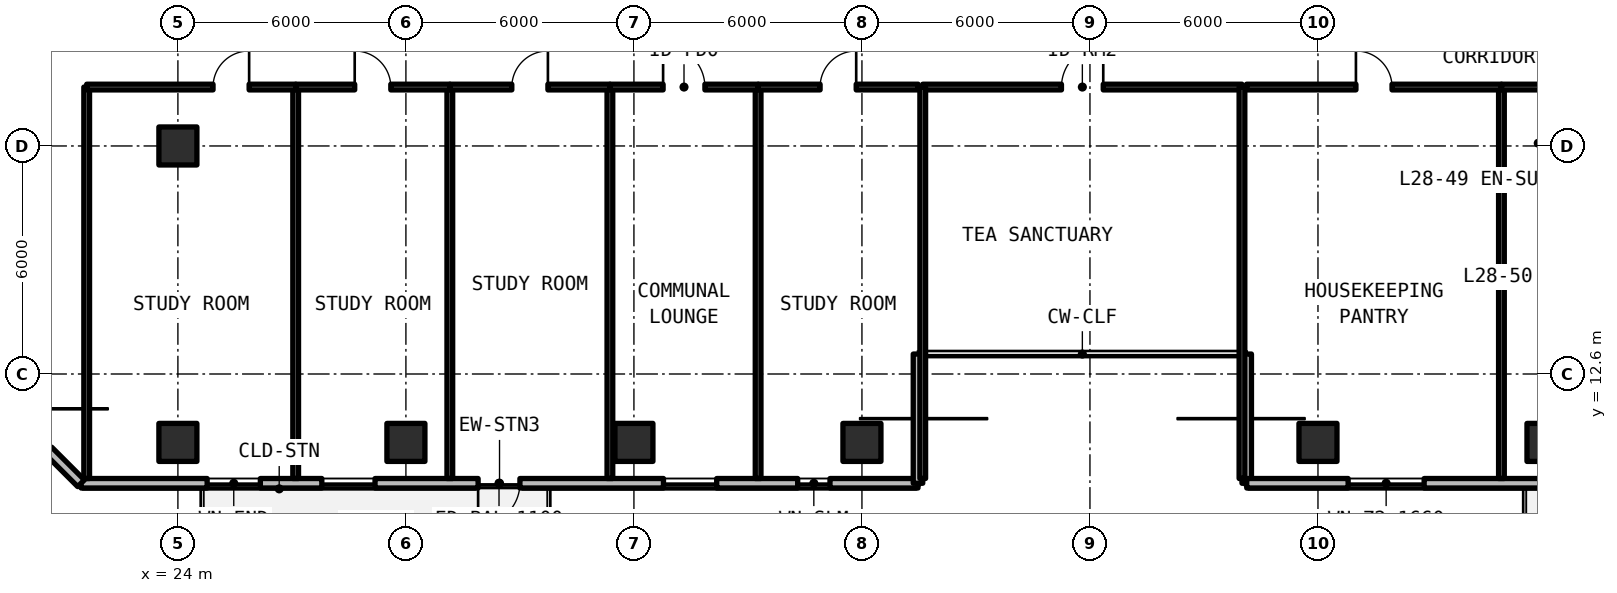
"""IFC4 building model, lengths in metres.
Left out: names, types, materials, properties, quantities, classifications, styles, units other than length and angle.
Written with IfcOpenShell. Run it as: python <this file> out.ifc"""

import sys

from ifc_helpers import new_model, si_unit, direction, frame, frame_2d, origin, origin_2d, place, context, subcontext, project, spatial, rectangle, extrude, element, fill, save


model = new_model("IFC4")
c1 = context("Model", 3, precision=1e-05, world=origin(), true_north=direction((0.0, 1.0)))
c2 = subcontext(c1, "Body", "Model", "MODEL_VIEW")
j1 = project(units=[si_unit("LENGTHUNIT", "METRE"), si_unit("PLANEANGLEUNIT", "RADIAN")], contexts=[c1])
p1 = place(None, origin())
s1 = spatial("IfcSite", under=j1, at=p1, CompositionType="ELEMENT")
p2 = place(p1, origin())
s2 = spatial("IfcBuilding", under=s1, at=p2, CompositionType="ELEMENT")
p3 = place(p2, frame((0.0, 0.0, 101.97)))
s3 = spatial("IfcBuildingStorey", under=s2, at=p3, CompositionType="ELEMENT", Elevation=101.97)
for number, where, z_axis, x_axis in (
    (1, (24.0, 18.6, 0.0), (0.0, 0.0, 1.0), (1.0, 0.0, 0.0)),
    (2, (24.0, 10.8, 0.0), (0.0, 0.0, 1.0), (1.0, 0.0, 0.0)),
    (3, (30.0, 10.8, 0.0), (0.0, 0.0, 1.0), (1.0, 0.0, 0.0)),
    (4, (36.0, 10.8, 0.0), (0.0, 0.0, 1.0), (1.0, 0.0, 0.0)),
    (5, (42.0, 10.8, 0.0), (0.0, 0.0, 1.0), (1.0, 0.0, 0.0)),
    (6, (54.0, 10.8, 0.0), (0.0, 0.0, 1.0), (1.0, 0.0, 0.0)),
    (7, (60.0, 10.8, 0.0), (0.0, 0.0, 1.0), (1.0, 0.0, 0.0)),
):
    element("IfcColumn", number, at=place(p3, frame(where, z_axis=z_axis, x_axis=x_axis)), inside=s3, PredefinedType="COLUMN", context=c2, shape_type="SweptSolid", body=[
        extrude(rectangle(XDim=1.0, YDim=1.0, at=origin_2d()), origin(), (0.0, 0.0, 1.0), 3.3),
    ])
p4 = place(p3, frame((21.452, 9.725, 0.0), z_axis=(0.0, 0.0, 1.0), x_axis=(1.0, 0.0, 0.0)))
e8 = element("IfcWall", 8, at=p4, inside=s3, PredefinedType="SOLIDWALL", context=c2, shape_type="SweptSolid", body=[
    extrude(rectangle(XDim=22.023, YDim=0.25, at=frame_2d((11.012, 0.0))), origin(), (0.0, 0.0, 1.0), 3.08),
])
p5 = place(p4, frame((10.448, 0.0, 0.0)))
e9 = element("IfcOpeningElement", 9, at=p5, cuts=e8, PredefinedType="OPENING", context=c2, shape_type="SweptSolid", body=[
    extrude(rectangle(XDim=1.1, YDim=2.15, at=frame_2d((0.55, 1.075))), frame((0.0, 0.135, 0.0), z_axis=(0.0, -1.0, 0.0), x_axis=(1.0, 0.0, 0.0)), (0.0, 0.0, 1.0), 0.27),
])
p6 = place(p4, frame((3.318, 0.0, 0.78)))
e10 = element("IfcOpeningElement", 10, at=p6, cuts=e8, PredefinedType="OPENING", context=c2, shape_type="SweptSolid", body=[
    extrude(rectangle(XDim=1.4, YDim=1.65, at=frame_2d((0.7, 0.825))), frame((0.0, 0.135, 0.0), z_axis=(0.0, -1.0, 0.0), x_axis=(1.0, 0.0, 0.0)), (0.0, 0.0, 1.0), 0.27),
])
p7 = place(p4, frame((6.336, 0.0, 0.78)))
e11 = element("IfcOpeningElement", 11, at=p7, cuts=e8, PredefinedType="OPENING", context=c2, shape_type="SweptSolid", body=[
    extrude(rectangle(XDim=1.4, YDim=1.65, at=frame_2d((0.7, 0.825))), frame((0.0, 0.135, 0.0), z_axis=(0.0, -1.0, 0.0), x_axis=(1.0, 0.0, 0.0)), (0.0, 0.0, 1.0), 0.27),
])
p8 = place(p4, frame((15.326, 0.0, 0.78)))
e12 = element("IfcOpeningElement", 12, at=p8, cuts=e8, PredefinedType="OPENING", context=c2, shape_type="SweptSolid", body=[
    extrude(rectangle(XDim=1.4, YDim=1.65, at=frame_2d((0.7, 0.825))), frame((0.0, 0.135, 0.0), z_axis=(0.0, -1.0, 0.0), x_axis=(1.0, 0.0, 0.0)), (0.0, 0.0, 1.0), 0.27),
])
p9 = place(p4, frame((18.857, 0.0, 0.78)))
e13 = element("IfcOpeningElement", 13, at=p9, cuts=e8, PredefinedType="OPENING", context=c2, shape_type="SweptSolid", body=[
    extrude(rectangle(XDim=0.85, YDim=1.65, at=frame_2d((0.425, 0.825))), frame((0.0, 0.135, 0.0), z_axis=(0.0, -1.0, 0.0), x_axis=(1.0, 0.0, 0.0)), (0.0, 0.0, 1.0), 0.27),
])
for number, where, z_axis, x_axis in (
    (14, (43.475, 9.725, 0.0), (0.0, 0.0, 1.0), (0.0, 1.0, 0.0)),
    (15, (52.125, 13.125, 0.0), (0.0, 0.0, 1.0), (0.0, -1.0, 0.0)),
):
    element("IfcWall", number, at=place(p3, frame(where, z_axis=z_axis, x_axis=x_axis)), inside=s3, PredefinedType="SOLIDWALL", context=c2, shape_type="SweptSolid", body=[
        extrude(rectangle(XDim=3.4, YDim=0.25, at=frame_2d((1.7, 0.0))), origin(), (0.0, 0.0, 1.0), 3.08),
    ])
p10 = place(p3, frame((52.125, 9.725, 0.0), z_axis=(0.0, 0.0, 1.0), x_axis=(1.0, 0.0, 0.0)))
e16 = element("IfcWall", 16, at=p10, inside=s3, PredefinedType="SOLIDWALL", context=c2, shape_type="SweptSolid", body=[
    extrude(rectangle(XDim=44.023, YDim=0.25, at=frame_2d((22.012, 0.0))), origin(), (0.0, 0.0, 1.0), 3.08),
])
p11 = place(p10, frame((11.075, 0.0, 0.0)))
e17 = element("IfcOpeningElement", 17, at=p11, cuts=e16, PredefinedType="OPENING", context=c2, shape_type="SweptSolid", body=[
    extrude(rectangle(XDim=1.1, YDim=2.15, at=frame_2d((0.55, 1.075))), frame((0.0, 0.135, 0.0), z_axis=(0.0, -1.0, 0.0), x_axis=(1.0, 0.0, 0.0)), (0.0, 0.0, 1.0), 0.27),
])
p12 = place(p10, frame((22.175, 0.0, 0.0)))
e18 = element("IfcOpeningElement", 18, at=p12, cuts=e16, PredefinedType="OPENING", context=c2, shape_type="SweptSolid", body=[
    extrude(rectangle(XDim=1.1, YDim=2.15, at=frame_2d((0.55, 1.075))), frame((0.0, 0.135, 0.0), z_axis=(0.0, -1.0, 0.0), x_axis=(1.0, 0.0, 0.0)), (0.0, 0.0, 1.0), 0.27),
])
p13 = place(p10, frame((34.525, 0.0, 0.0)))
e19 = element("IfcOpeningElement", 19, at=p13, cuts=e16, PredefinedType="OPENING", context=c2, shape_type="SweptSolid", body=[
    extrude(rectangle(XDim=1.1, YDim=2.15, at=frame_2d((0.55, 1.075))), frame((0.0, 0.135, 0.0), z_axis=(0.0, -1.0, 0.0), x_axis=(1.0, 0.0, 0.0)), (0.0, 0.0, 1.0), 0.27),
])
p14 = place(p10, frame((2.669, 0.0, 0.78)))
e20 = element("IfcOpeningElement", 20, at=p14, cuts=e16, PredefinedType="OPENING", context=c2, shape_type="SweptSolid", body=[
    extrude(rectangle(XDim=2.0, YDim=1.66, at=frame_2d((1.0, 0.83))), frame((0.0, 0.135, 0.0), z_axis=(0.0, -1.0, 0.0), x_axis=(1.0, 0.0, 0.0)), (0.0, 0.0, 1.0), 0.27),
])
p15 = place(p10, frame((8.314, 0.0, 0.78)))
e21 = element("IfcOpeningElement", 21, at=p15, cuts=e16, PredefinedType="OPENING", context=c2, shape_type="SweptSolid", body=[
    extrude(rectangle(XDim=0.85, YDim=1.65, at=frame_2d((0.425, 0.825))), frame((0.0, 0.135, 0.0), z_axis=(0.0, -1.0, 0.0), x_axis=(1.0, 0.0, 0.0)), (0.0, 0.0, 1.0), 0.27),
])
p16 = place(p10, frame((15.009, 0.0, 0.78)))
e22 = element("IfcOpeningElement", 22, at=p16, cuts=e16, PredefinedType="OPENING", context=c2, shape_type="SweptSolid", body=[
    extrude(rectangle(XDim=0.85, YDim=1.65, at=frame_2d((0.425, 0.825))), frame((0.0, 0.135, 0.0), z_axis=(0.0, -1.0, 0.0), x_axis=(1.0, 0.0, 0.0)), (0.0, 0.0, 1.0), 0.27),
])
p17 = place(p10, frame((17.708, 0.0, 0.78)))
e23 = element("IfcOpeningElement", 23, at=p17, cuts=e16, PredefinedType="OPENING", context=c2, shape_type="SweptSolid", body=[
    extrude(rectangle(XDim=1.4, YDim=1.65, at=frame_2d((0.7, 0.825))), frame((0.0, 0.135, 0.0), z_axis=(0.0, -1.0, 0.0), x_axis=(1.0, 0.0, 0.0)), (0.0, 0.0, 1.0), 0.27),
])
p18 = place(p10, frame((26.714, 0.0, 0.78)))
e24 = element("IfcOpeningElement", 24, at=p18, cuts=e16, PredefinedType="OPENING", context=c2, shape_type="SweptSolid", body=[
    extrude(rectangle(XDim=1.4, YDim=1.65, at=frame_2d((0.7, 0.825))), frame((0.0, 0.135, 0.0), z_axis=(0.0, -1.0, 0.0), x_axis=(1.0, 0.0, 0.0)), (0.0, 0.0, 1.0), 0.27),
])
p19 = place(p10, frame((29.618, 0.0, 0.78)))
e25 = element("IfcOpeningElement", 25, at=p19, cuts=e16, PredefinedType="OPENING", context=c2, shape_type="SweptSolid", body=[
    extrude(rectangle(XDim=1.4, YDim=1.65, at=frame_2d((0.7, 0.825))), frame((0.0, 0.135, 0.0), z_axis=(0.0, -1.0, 0.0), x_axis=(1.0, 0.0, 0.0)), (0.0, 0.0, 1.0), 0.27),
])
p20 = place(p10, frame((39.102, 0.0, 0.78)))
e26 = element("IfcOpeningElement", 26, at=p20, cuts=e16, PredefinedType="OPENING", context=c2, shape_type="SweptSolid", body=[
    extrude(rectangle(XDim=2.0, YDim=1.66, at=frame_2d((1.0, 0.83))), frame((0.0, 0.135, 0.0), z_axis=(0.0, -1.0, 0.0), x_axis=(1.0, 0.0, 0.0)), (0.0, 0.0, 1.0), 0.27),
])
p21 = place(p3, frame((17.325, 13.852, 0.0), z_axis=(0.0, 0.0, 1.0), x_axis=(0.707127696864, -0.70708586489, 0.0)))
e27 = element("IfcWall", 27, at=p21, inside=s3, PredefinedType="SOLIDWALL", context=c2, shape_type="SweptSolid", body=[
    extrude(rectangle(XDim=5.836, YDim=0.25, at=frame_2d((2.918, 0.0))), origin(), (0.0, 0.0, 1.0), 3.08),
])
p22 = place(p21, frame((1.218, 0.0, 0.78)))
e28 = element("IfcOpeningElement", 28, at=p22, cuts=e27, PredefinedType="OPENING", context=c2, shape_type="SweptSolid", body=[
    extrude(rectangle(XDim=3.4, YDim=1.66, at=frame_2d((1.7, 0.83))), frame((0.0, 0.135, 0.0), z_axis=(0.0, -1.0, 0.0), x_axis=(1.0, 0.0, 0.0)), (0.0, 0.0, 1.0), 0.27),
])
p23 = place(p3, frame((43.6, 20.15, 0.0), z_axis=(0.0, 0.0, 1.0), x_axis=(1.0, 0.0, 0.0)))
e29 = element("IfcWall", 29, at=p23, inside=s3, PredefinedType="SOLIDWALL", context=c2, shape_type="SweptSolid", body=[
    extrude(rectangle(XDim=8.4, YDim=0.15, at=frame_2d((4.2, 0.0))), origin(), (0.0, 0.0, 1.0), 2.35),
])
p24 = place(p23, frame((3.65, 0.0, 0.0)))
e30 = element("IfcOpeningElement", 30, at=p24, cuts=e29, PredefinedType="OPENING", context=c2, shape_type="SweptSolid", body=[
    extrude(rectangle(XDim=1.1, YDim=2.15, at=frame_2d((0.55, 1.075))), frame((0.0, 0.085, 0.0), z_axis=(0.0, -1.0, 0.0), x_axis=(1.0, 0.0, 0.0)), (0.0, 0.0, 1.0), 0.17),
])
for number, where, z_axis, x_axis in (
    (31, (43.6, 9.85, 0.0), (0.0, 0.0, 1.0), (0.0, 1.0, 0.0)),
    (32, (52.0, 9.85, 0.0), (0.0, 0.0, 1.0), (0.0, 1.0, 0.0)),
    (33, (21.6, 9.85, 0.0), (0.0, 0.0, 1.0), (0.0, 1.0, 0.0)),
    (34, (27.099, 9.85, 0.0), (0.0, 0.0, 1.0), (0.0, 1.0, 0.0)),
):
    element("IfcWall", number, at=place(p3, frame(where, z_axis=z_axis, x_axis=x_axis)), inside=s3, PredefinedType="SOLIDWALL", context=c2, shape_type="SweptSolid", body=[
        extrude(rectangle(XDim=10.3, YDim=0.15, at=frame_2d((5.15, 0.0))), origin(), (0.0, 0.0, 1.0), 2.35),
    ])
p25 = place(p3, frame((21.6, 20.15, 0.0), z_axis=(0.0, 0.0, 1.0), x_axis=(1.0, 0.0, 0.0)))
e35 = element("IfcWall", 35, at=p25, inside=s3, PredefinedType="SOLIDWALL", context=c2, shape_type="SweptSolid", body=[
    extrude(rectangle(XDim=5.499, YDim=0.15, at=frame_2d((2.75, 0.0))), origin(), (0.0, 0.0, 1.0), 2.35),
])
p26 = place(p25, frame((3.325, 0.0, 0.0)))
e36 = element("IfcOpeningElement", 36, at=p26, cuts=e35, PredefinedType="OPENING", context=c2, shape_type="SweptSolid", body=[
    extrude(rectangle(XDim=0.95, YDim=2.15, at=frame_2d((0.475, 1.075))), frame((0.0, 0.085, 0.0), z_axis=(0.0, -1.0, 0.0), x_axis=(1.0, 0.0, 0.0)), (0.0, 0.0, 1.0), 0.17),
])
p27 = place(p3, frame((31.156, 9.85, 0.0), z_axis=(0.0, 0.0, 1.0), x_axis=(0.0, 1.0, 0.0)))
e37 = element("IfcWall", 37, at=p27, inside=s3, PredefinedType="SOLIDWALL", context=c2, shape_type="SweptSolid", body=[
    extrude(rectangle(XDim=10.3, YDim=0.15, at=frame_2d((5.15, 0.0))), origin(), (0.0, 0.0, 1.0), 2.35),
])
p28 = place(p3, frame((27.099, 20.15, 0.0), z_axis=(0.0, 0.0, 1.0), x_axis=(1.0, 0.0, 0.0)))
e38 = element("IfcWall", 38, at=p28, inside=s3, PredefinedType="SOLIDWALL", context=c2, shape_type="SweptSolid", body=[
    extrude(rectangle(XDim=4.056, YDim=0.15, at=frame_2d((2.028, 0.0))), origin(), (0.0, 0.0, 1.0), 2.35),
])
p29 = place(p28, frame((1.553, 0.0, 0.0)))
e39 = element("IfcOpeningElement", 39, at=p29, cuts=e38, PredefinedType="OPENING", context=c2, shape_type="SweptSolid", body=[
    extrude(rectangle(XDim=0.95, YDim=2.15, at=frame_2d((0.475, 1.075))), frame((0.0, 0.085, 0.0), z_axis=(0.0, -1.0, 0.0), x_axis=(1.0, 0.0, 0.0)), (0.0, 0.0, 1.0), 0.17),
])
p30 = place(p3, frame((35.368, 9.85, 0.0), z_axis=(0.0, 0.0, 1.0), x_axis=(0.0, 1.0, 0.0)))
e40 = element("IfcWall", 40, at=p30, inside=s3, PredefinedType="SOLIDWALL", context=c2, shape_type="SweptSolid", body=[
    extrude(rectangle(XDim=10.3, YDim=0.15, at=frame_2d((5.15, 0.0))), origin(), (0.0, 0.0, 1.0), 2.35),
])
p31 = place(p3, frame((31.156, 20.15, 0.0), z_axis=(0.0, 0.0, 1.0), x_axis=(1.0, 0.0, 0.0)))
e41 = element("IfcWall", 41, at=p31, inside=s3, PredefinedType="SOLIDWALL", context=c2, shape_type="SweptSolid", body=[
    extrude(rectangle(XDim=4.212, YDim=0.15, at=frame_2d((2.106, 0.0))), origin(), (0.0, 0.0, 1.0), 2.35),
])
p32 = place(p31, frame((1.631, 0.0, 0.0)))
e42 = element("IfcOpeningElement", 42, at=p32, cuts=e41, PredefinedType="OPENING", context=c2, shape_type="SweptSolid", body=[
    extrude(rectangle(XDim=0.95, YDim=2.15, at=frame_2d((0.475, 1.075))), frame((0.0, 0.085, 0.0), z_axis=(0.0, -1.0, 0.0), x_axis=(1.0, 0.0, 0.0)), (0.0, 0.0, 1.0), 0.17),
])
p33 = place(p3, frame((39.268, 9.85, 0.0), z_axis=(0.0, 0.0, 1.0), x_axis=(0.0, 1.0, 0.0)))
e43 = element("IfcWall", 43, at=p33, inside=s3, PredefinedType="SOLIDWALL", context=c2, shape_type="SweptSolid", body=[
    extrude(rectangle(XDim=10.3, YDim=0.15, at=frame_2d((5.15, 0.0))), origin(), (0.0, 0.0, 1.0), 2.35),
])
p34 = place(p3, frame((35.368, 20.15, 0.0), z_axis=(0.0, 0.0, 1.0), x_axis=(1.0, 0.0, 0.0)))
e44 = element("IfcWall", 44, at=p34, inside=s3, PredefinedType="SOLIDWALL", context=c2, shape_type="SweptSolid", body=[
    extrude(rectangle(XDim=3.9, YDim=0.15, at=frame_2d((1.95, 0.0))), origin(), (0.0, 0.0, 1.0), 2.35),
])
p35 = place(p34, frame((1.4, 0.0, 0.0)))
e45 = element("IfcOpeningElement", 45, at=p35, cuts=e44, PredefinedType="OPENING", context=c2, shape_type="SweptSolid", body=[
    extrude(rectangle(XDim=1.1, YDim=2.15, at=frame_2d((0.55, 1.075))), frame((0.0, 0.085, 0.0), z_axis=(0.0, -1.0, 0.0), x_axis=(1.0, 0.0, 0.0)), (0.0, 0.0, 1.0), 0.17),
])
p36 = place(p3, frame((39.268, 20.15, 0.0), z_axis=(0.0, 0.0, 1.0), x_axis=(1.0, 0.0, 0.0)))
e46 = element("IfcWall", 46, at=p36, inside=s3, PredefinedType="SOLIDWALL", context=c2, shape_type="SweptSolid", body=[
    extrude(rectangle(XDim=4.212, YDim=0.15, at=frame_2d((2.106, 0.0))), origin(), (0.0, 0.0, 1.0), 2.35),
])
p37 = place(p36, frame((1.631, 0.0, 0.0)))
e47 = element("IfcOpeningElement", 47, at=p37, cuts=e46, PredefinedType="OPENING", context=c2, shape_type="SweptSolid", body=[
    extrude(rectangle(XDim=0.95, YDim=2.15, at=frame_2d((0.475, 1.075))), frame((0.0, 0.085, 0.0), z_axis=(0.0, -1.0, 0.0), x_axis=(1.0, 0.0, 0.0)), (0.0, 0.0, 1.0), 0.17),
])
p38 = place(p3, frame((58.828, 9.85, 0.0), z_axis=(0.0, 0.0, 1.0), x_axis=(0.0, 1.0, 0.0)))
e48 = element("IfcWall", 48, at=p38, inside=s3, PredefinedType="SOLIDWALL", context=c2, shape_type="SweptSolid", body=[
    extrude(rectangle(XDim=10.3, YDim=0.15, at=frame_2d((5.15, 0.0))), origin(), (0.0, 0.0, 1.0), 2.35),
])
p39 = place(p3, frame((52.12, 20.15, 0.0), z_axis=(0.0, 0.0, 1.0), x_axis=(1.0, 0.0, 0.0)))
e49 = element("IfcWall", 49, at=p39, inside=s3, PredefinedType="SOLIDWALL", context=c2, shape_type="SweptSolid", body=[
    extrude(rectangle(XDim=6.708, YDim=0.15, at=frame_2d((3.354, 0.0))), origin(), (0.0, 0.0, 1.0), 2.35),
])
p40 = place(p39, frame((2.879, 0.0, 0.0)))
e50 = element("IfcOpeningElement", 50, at=p40, cuts=e49, PredefinedType="OPENING", context=c2, shape_type="SweptSolid", body=[
    extrude(rectangle(XDim=0.95, YDim=2.15, at=frame_2d((0.475, 1.075))), frame((0.0, 0.085, 0.0), z_axis=(0.0, -1.0, 0.0), x_axis=(1.0, 0.0, 0.0)), (0.0, 0.0, 1.0), 0.17),
])
p41 = place(p3, frame((58.828, 17.7, 0.0), z_axis=(0.0, 0.0, 1.0), x_axis=(1.0, 0.0, 0.0)))
e51 = element("IfcWall", 51, at=p41, inside=s3, PredefinedType="PARTITIONING", context=c2, shape_type="SweptSolid", body=[
    extrude(rectangle(XDim=3.092, YDim=0.15, at=frame_2d((1.546, 0.0))), origin(), (0.0, 0.0, 1.0), 2.35),
])
p42 = place(p3, frame((58.828, 20.15, 0.0), z_axis=(0.0, 0.0, 1.0), x_axis=(1.0, 0.0, 0.0)))
e52 = element("IfcWall", 52, at=p42, inside=s3, PredefinedType="SOLIDWALL", context=c2, shape_type="SweptSolid", body=[
    extrude(rectangle(XDim=7.546, YDim=0.15, at=frame_2d((3.773, 0.0))), origin(), (0.0, 0.0, 1.0), 2.35),
])
p43 = place(p42, frame((4.884, 0.0, 0.0)))
e53 = element("IfcOpeningElement", 53, at=p43, cuts=e52, PredefinedType="OPENING", context=c2, shape_type="SweptSolid", body=[
    extrude(rectangle(XDim=0.95, YDim=2.15, at=frame_2d((0.475, 1.075))), frame((0.0, 0.085, 0.0), z_axis=(0.0, -1.0, 0.0), x_axis=(1.0, 0.0, 0.0)), (0.0, 0.0, 1.0), 0.17),
])
p44 = place(p5, frame((1.1, 0.0, 0.0), z_axis=(0.0, 0.0, 1.0), x_axis=(-1.0, 0.0, 0.0)))
e54 = element("IfcDoor", 54, at=p44, inside=s3, OperationType="SINGLE_SWING_RIGHT", PredefinedType="DOOR", context=c2, shape_type="SweptSolid", body=[
    extrude(rectangle(XDim=1.1, YDim=2.15, at=frame_2d((0.55, 1.075))), frame((0.0, 0.025, 0.0), z_axis=(0.0, -1.0, 0.0), x_axis=(1.0, 0.0, 0.0)), (0.0, 0.0, 1.0), 0.05),
])
fill(e9, e54)
p45 = place(p6, origin())
e55 = element("IfcWindow", 55, at=p45, inside=s3, PartitioningType="SINGLE_PANEL", PredefinedType="WINDOW", context=c2, shape_type="SweptSolid", body=[
    extrude(rectangle(XDim=1.4, YDim=1.65, at=frame_2d((0.7, 0.825))), frame((0.0, 0.03, 0.0), z_axis=(0.0, -1.0, 0.0), x_axis=(1.0, 0.0, 0.0)), (0.0, 0.0, 1.0), 0.06),
])
fill(e10, e55)
p46 = place(p7, origin())
e56 = element("IfcWindow", 56, at=p46, inside=s3, PartitioningType="SINGLE_PANEL", PredefinedType="WINDOW", context=c2, shape_type="SweptSolid", body=[
    extrude(rectangle(XDim=1.4, YDim=1.65, at=frame_2d((0.7, 0.825))), frame((0.0, 0.03, 0.0), z_axis=(0.0, -1.0, 0.0), x_axis=(1.0, 0.0, 0.0)), (0.0, 0.0, 1.0), 0.06),
])
fill(e11, e56)
p47 = place(p8, origin())
e57 = element("IfcWindow", 57, at=p47, inside=s3, PartitioningType="SINGLE_PANEL", PredefinedType="WINDOW", context=c2, shape_type="SweptSolid", body=[
    extrude(rectangle(XDim=1.4, YDim=1.65, at=frame_2d((0.7, 0.825))), frame((0.0, 0.03, 0.0), z_axis=(0.0, -1.0, 0.0), x_axis=(1.0, 0.0, 0.0)), (0.0, 0.0, 1.0), 0.06),
])
fill(e12, e57)
p48 = place(p9, origin())
e58 = element("IfcWindow", 58, at=p48, inside=s3, PartitioningType="SINGLE_PANEL", PredefinedType="WINDOW", context=c2, shape_type="SweptSolid", body=[
    extrude(rectangle(XDim=0.85, YDim=1.65, at=frame_2d((0.425, 0.825))), frame((0.0, 0.03, 0.0), z_axis=(0.0, -1.0, 0.0), x_axis=(1.0, 0.0, 0.0)), (0.0, 0.0, 1.0), 0.06),
])
fill(e13, e58)
p49 = place(p14, origin())
e59 = element("IfcWindow", 59, at=p49, inside=s3, PartitioningType="SINGLE_PANEL", PredefinedType="WINDOW", context=c2, shape_type="SweptSolid", body=[
    extrude(rectangle(XDim=2.0, YDim=1.66, at=frame_2d((1.0, 0.83))), frame((0.0, 0.03, 0.0), z_axis=(0.0, -1.0, 0.0), x_axis=(1.0, 0.0, 0.0)), (0.0, 0.0, 1.0), 0.06),
])
fill(e20, e59)
p50 = place(p24, origin())
e60 = element("IfcDoor", 60, at=p50, inside=s3, OperationType="SINGLE_SWING_RIGHT", PredefinedType="DOOR", context=c2, shape_type="SweptSolid", body=[
    extrude(rectangle(XDim=1.1, YDim=2.15, at=frame_2d((0.55, 1.075))), frame((0.0, 0.025, 0.0), z_axis=(0.0, -1.0, 0.0), x_axis=(1.0, 0.0, 0.0)), (0.0, 0.0, 1.0), 0.05),
])
fill(e30, e60)
p51 = place(p26, origin())
e61 = element("IfcDoor", 61, at=p51, inside=s3, OperationType="SINGLE_SWING_RIGHT", PredefinedType="DOOR", context=c2, shape_type="SweptSolid", body=[
    extrude(rectangle(XDim=0.95, YDim=2.15, at=frame_2d((0.475, 1.075))), frame((0.0, 0.025, 0.0), z_axis=(0.0, -1.0, 0.0), x_axis=(1.0, 0.0, 0.0)), (0.0, 0.0, 1.0), 0.05),
])
fill(e36, e61)
p52 = place(p29, origin())
e62 = element("IfcDoor", 62, at=p52, inside=s3, OperationType="SINGLE_SWING_LEFT", PredefinedType="DOOR", context=c2, shape_type="SweptSolid", body=[
    extrude(rectangle(XDim=0.95, YDim=2.15, at=frame_2d((0.475, 1.075))), frame((0.0, 0.025, 0.0), z_axis=(0.0, -1.0, 0.0), x_axis=(1.0, 0.0, 0.0)), (0.0, 0.0, 1.0), 0.05),
])
fill(e39, e62)
p53 = place(p32, origin())
e63 = element("IfcDoor", 63, at=p53, inside=s3, OperationType="SINGLE_SWING_RIGHT", PredefinedType="DOOR", context=c2, shape_type="SweptSolid", body=[
    extrude(rectangle(XDim=0.95, YDim=2.15, at=frame_2d((0.475, 1.075))), frame((0.0, 0.025, 0.0), z_axis=(0.0, -1.0, 0.0), x_axis=(1.0, 0.0, 0.0)), (0.0, 0.0, 1.0), 0.05),
])
fill(e42, e63)
p54 = place(p35, origin())
e64 = element("IfcDoor", 64, at=p54, inside=s3, OperationType="SINGLE_SWING_LEFT", PredefinedType="DOOR", context=c2, shape_type="SweptSolid", body=[
    extrude(rectangle(XDim=1.1, YDim=2.15, at=frame_2d((0.55, 1.075))), frame((0.0, 0.025, 0.0), z_axis=(0.0, -1.0, 0.0), x_axis=(1.0, 0.0, 0.0)), (0.0, 0.0, 1.0), 0.05),
])
fill(e45, e64)
p55 = place(p37, origin())
e65 = element("IfcDoor", 65, at=p55, inside=s3, OperationType="SINGLE_SWING_RIGHT", PredefinedType="DOOR", context=c2, shape_type="SweptSolid", body=[
    extrude(rectangle(XDim=0.95, YDim=2.15, at=frame_2d((0.475, 1.075))), frame((0.0, 0.025, 0.0), z_axis=(0.0, -1.0, 0.0), x_axis=(1.0, 0.0, 0.0)), (0.0, 0.0, 1.0), 0.05),
])
fill(e47, e65)
p56 = place(p40, origin())
e66 = element("IfcDoor", 66, at=p56, inside=s3, OperationType="SINGLE_SWING_LEFT", PredefinedType="DOOR", context=c2, shape_type="SweptSolid", body=[
    extrude(rectangle(XDim=0.95, YDim=2.15, at=frame_2d((0.475, 1.075))), frame((0.0, 0.025, 0.0), z_axis=(0.0, -1.0, 0.0), x_axis=(1.0, 0.0, 0.0)), (0.0, 0.0, 1.0), 0.05),
])
fill(e50, e66)
save(model, sys.argv[1])
